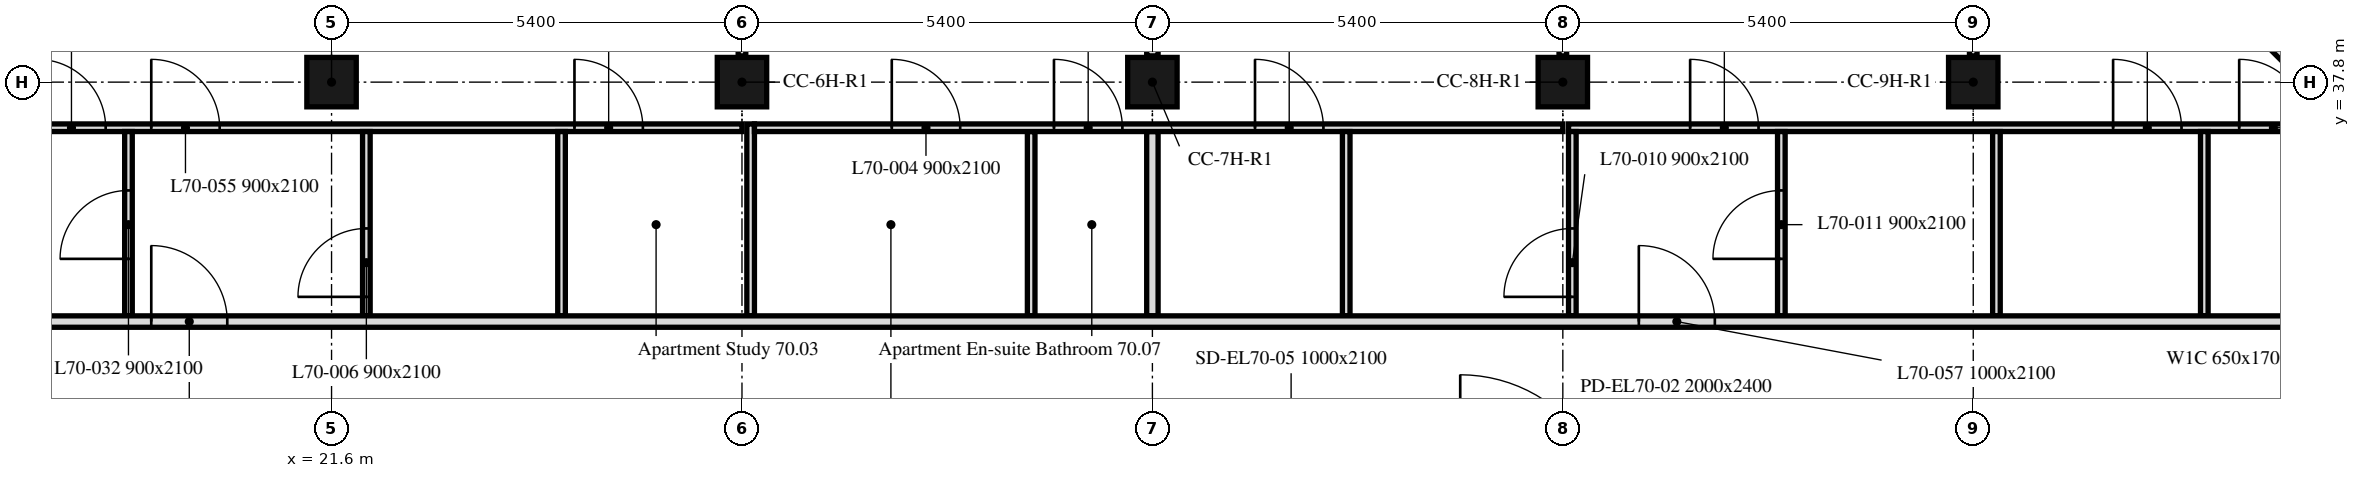
"""IFC4 building model, lengths in metres.
Left out: names, types, materials, properties, quantities, classifications, styles, units other than length and angle.
Written with IfcOpenShell. Run it as: python <this file> out.ifc"""

import sys

from ifc_helpers import new_model, si_unit, direction, frame, frame_2d, origin, origin_2d, place, context, subcontext, project, spatial, rectangle, extrude, element, fill, save


model = new_model("IFC4")
c1 = context("Model", 3, precision=1e-05, world=origin(), true_north=direction((0.0, 1.0)))
c2 = subcontext(c1, "Body", "Model", "MODEL_VIEW")
j1 = project(units=[si_unit("LENGTHUNIT", "METRE"), si_unit("PLANEANGLEUNIT", "RADIAN")], contexts=[c1])
p1 = place(None, origin())
s1 = spatial("IfcSite", under=j1, at=p1, CompositionType="ELEMENT")
p2 = place(p1, origin())
s2 = spatial("IfcBuilding", under=s1, at=p2, CompositionType="ELEMENT")
p3 = place(p2, frame((0.0, 0.0, 285.1)))
s3 = spatial("IfcBuildingStorey", under=s2, at=p3, CompositionType="ELEMENT", Elevation=285.1)
for number, where, z_axis, x_axis in (
    (1, (21.6, 37.8, 0.0), (0.0, 0.0, 1.0), (1.0, 0.0, 0.0)),
    (2, (27.0, 37.8, 0.0), (0.0, 0.0, 1.0), (1.0, 0.0, 0.0)),
    (3, (32.4, 37.8, 0.0), (0.0, 0.0, 1.0), (1.0, 0.0, 0.0)),
    (4, (37.8, 37.8, 0.0), (0.0, 0.0, 1.0), (1.0, 0.0, 0.0)),
    (5, (43.2, 37.8, 0.0), (0.0, 0.0, 1.0), (1.0, 0.0, 0.0)),
):
    element("IfcColumn", number, at=place(p3, frame(where, z_axis=z_axis, x_axis=x_axis)), inside=s3, PredefinedType="COLUMN", context=c2, shape_type="SweptSolid", body=[
        extrude(rectangle(XDim=0.65, YDim=0.65, at=origin_2d()), origin(), (0.0, 0.0, 1.0), 3.0),
    ])
p4 = place(p3, frame((47.901, 37.65, 0.0), z_axis=(0.0, 0.0, 1.0), x_axis=(-0.707106781187, 0.707106781187, 0.0)))
e6 = element("IfcWall", 6, at=p4, inside=s3, PredefinedType="SOLIDWALL", context=c2, shape_type="SweptSolid", body=[
    extrude(rectangle(XDim=6.86, YDim=0.3, at=frame_2d((3.43, 0.0))), origin(), (0.0, 0.0, 1.0), 3.0),
])
p5 = place(p4, frame((1.73, 0.0, 0.9)))
e7 = element("IfcOpeningElement", 7, at=p5, cuts=e6, PredefinedType="OPENING", context=c2, shape_type="SweptSolid", body=[
    extrude(rectangle(XDim=3.4, YDim=1.7, at=frame_2d((1.7, 0.85))), frame((0.0, 0.16, 0.0), z_axis=(0.0, -1.0, 0.0), x_axis=(1.0, 0.0, 0.0)), (0.0, 0.0, 1.0), 0.32),
])
p6 = place(p3, frame((10.8, 37.2, 0.0), z_axis=(0.0, 0.0, 1.0), x_axis=(1.0, 0.0, 0.0)))
e8 = element("IfcWall", 8, at=p6, inside=s3, PredefinedType="PARTITIONING", context=c2, shape_type="SweptSolid", body=[
    extrude(rectangle(XDim=16.2, YDim=0.1, at=frame_2d((8.1, 0.0))), origin(), (0.0, 0.0, 1.0), 2.4),
])
p7 = place(p6, frame((2.995, 0.0, 0.0)))
e9 = element("IfcOpeningElement", 9, at=p7, cuts=e8, PredefinedType="OPENING", context=c2, shape_type="SweptSolid", body=[
    extrude(rectangle(XDim=0.9, YDim=2.1, at=frame_2d((0.45, 1.05))), frame((0.0, 0.05, 0.0), z_axis=(0.0, -1.0, 0.0), x_axis=(1.0, 0.0, 0.0)), (0.0, 0.0, 1.0), 0.1),
])
p8 = place(p6, frame((13.996, 0.0, 0.0)))
e10 = element("IfcOpeningElement", 10, at=p8, cuts=e8, PredefinedType="OPENING", context=c2, shape_type="SweptSolid", body=[
    extrude(rectangle(XDim=0.9, YDim=2.1, at=frame_2d((0.45, 1.05))), frame((0.0, 0.05, 0.0), z_axis=(0.0, -1.0, 0.0), x_axis=(1.0, 0.0, 0.0)), (0.0, 0.0, 1.0), 0.1),
])
p9 = place(p6, frame((6.928, 0.0, 0.0)))
e11 = element("IfcOpeningElement", 11, at=p9, cuts=e8, PredefinedType="OPENING", context=c2, shape_type="SweptSolid", body=[
    extrude(rectangle(XDim=0.9, YDim=2.1, at=frame_2d((0.45, 1.05))), frame((0.0, 0.05, 0.0), z_axis=(0.0, -1.0, 0.0), x_axis=(1.0, 0.0, 0.0)), (0.0, 0.0, 1.0), 0.1),
])
p10 = place(p6, frame((8.428, 0.0, 0.0)))
e12 = element("IfcOpeningElement", 12, at=p10, cuts=e8, PredefinedType="OPENING", context=c2, shape_type="SweptSolid", body=[
    extrude(rectangle(XDim=0.9, YDim=2.1, at=frame_2d((0.45, 1.05))), frame((0.0, 0.05, 0.0), z_axis=(0.0, -1.0, 0.0), x_axis=(1.0, 0.0, 0.0)), (0.0, 0.0, 1.0), 0.1),
])
p11 = place(p3, frame((27.0, 38.145, 0.0), z_axis=(0.0, 0.0, 1.0), x_axis=(0.0, 1.0, 0.0)))
e13 = element("IfcWall", 13, at=p11, inside=s3, PredefinedType="PARTITIONING", context=c2, shape_type="SweptSolid", body=[
    extrude(rectangle(XDim=4.304, YDim=0.1, at=frame_2d((2.152, 0.0))), origin(), (0.0, 0.0, 1.0), 2.4),
])
p12 = place(p11, frame((1.98, 0.0, 0.0)))
e14 = element("IfcOpeningElement", 14, at=p12, cuts=e13, PredefinedType="OPENING", context=c2, shape_type="SweptSolid", body=[
    extrude(rectangle(XDim=0.9, YDim=2.1, at=frame_2d((0.45, 1.05))), frame((0.0, 0.05, 0.0), z_axis=(0.0, -1.0, 0.0), x_axis=(1.0, 0.0, 0.0)), (0.0, 0.0, 1.0), 0.1),
])
p13 = place(p3, frame((32.4, 38.145, 0.0), z_axis=(0.0, 0.0, 1.0), x_axis=(0.0, 1.0, 0.0)))
e15 = element("IfcWall", 15, at=p13, inside=s3, PredefinedType="PARTITIONING", context=c2, shape_type="SweptSolid", body=[
    extrude(rectangle(XDim=4.304, YDim=0.15, at=frame_2d((2.152, 0.0))), origin(), (0.0, 0.0, 1.0), 2.4),
])
p14 = place(p3, frame((18.928, 34.725, 0.0), z_axis=(0.0, 0.0, 1.0), x_axis=(0.0, 1.0, 0.0)))
e16 = element("IfcWall", 16, at=p14, inside=s3, PredefinedType="PARTITIONING", context=c2, shape_type="SweptSolid", body=[
    extrude(rectangle(XDim=2.425, YDim=0.1, at=frame_2d((1.212, 0.0))), origin(), (0.0, 0.0, 1.0), 3.0),
])
p15 = place(p14, frame((0.75, 0.0, 0.0)))
e17 = element("IfcOpeningElement", 17, at=p15, cuts=e16, PredefinedType="OPENING", context=c2, shape_type="SweptSolid", body=[
    extrude(rectangle(XDim=0.9, YDim=2.1, at=frame_2d((0.45, 1.05))), frame((0.0, 0.05, 0.0), z_axis=(0.0, -1.0, 0.0), x_axis=(1.0, 0.0, 0.0)), (0.0, 0.0, 1.0), 0.1),
])
p16 = place(p3, frame((22.058, 34.725, 0.0), z_axis=(0.0, 0.0, 1.0), x_axis=(0.0, 1.0, 0.0)))
e18 = element("IfcWall", 18, at=p16, inside=s3, PredefinedType="PARTITIONING", context=c2, shape_type="SweptSolid", body=[
    extrude(rectangle(XDim=2.425, YDim=0.1, at=frame_2d((1.212, 0.0))), origin(), (0.0, 0.0, 1.0), 3.0),
])
p17 = place(p16, frame((0.25, 0.0, 0.0)))
e19 = element("IfcOpeningElement", 19, at=p17, cuts=e18, PredefinedType="OPENING", context=c2, shape_type="SweptSolid", body=[
    extrude(rectangle(XDim=0.9, YDim=2.1, at=frame_2d((0.45, 1.05))), frame((0.0, 0.05, 0.0), z_axis=(0.0, -1.0, 0.0), x_axis=(1.0, 0.0, 0.0)), (0.0, 0.0, 1.0), 0.1),
])
p18 = place(p3, frame((24.626, 34.725, 0.0), z_axis=(0.0, 0.0, 1.0), x_axis=(0.0, 1.0, 0.0)))
e20 = element("IfcWall", 20, at=p18, inside=s3, PredefinedType="PARTITIONING", context=c2, shape_type="SweptSolid", body=[
    extrude(rectangle(XDim=2.425, YDim=0.1, at=frame_2d((1.212, 0.0))), origin(), (0.0, 0.0, 1.0), 3.0),
])
p19 = place(p3, frame((27.114, 34.725, 0.0), z_axis=(0.0, 0.0, 1.0), x_axis=(0.0, 1.0, 0.0)))
e21 = element("IfcWall", 21, at=p19, inside=s3, PredefinedType="PARTITIONING", context=c2, shape_type="SweptSolid", body=[
    extrude(rectangle(XDim=2.525, YDim=0.1, at=frame_2d((1.262, 0.0))), origin(), (0.0, 0.0, 1.0), 2.4),
])
p20 = place(p3, frame((30.805, 34.725, 0.0), z_axis=(0.0, 0.0, 1.0), x_axis=(0.0, 1.0, 0.0)))
e22 = element("IfcWall", 22, at=p20, inside=s3, PredefinedType="PARTITIONING", context=c2, shape_type="SweptSolid", body=[
    extrude(rectangle(XDim=2.425, YDim=0.1, at=frame_2d((1.212, 0.0))), origin(), (0.0, 0.0, 1.0), 3.0),
])
p21 = place(p3, frame((32.4, 34.725, 0.0), z_axis=(0.0, 0.0, 1.0), x_axis=(0.0, 1.0, 0.0)))
e23 = element("IfcWall", 23, at=p21, inside=s3, PredefinedType="PARTITIONING", context=c2, shape_type="SweptSolid", body=[
    extrude(rectangle(XDim=2.425, YDim=0.15, at=frame_2d((1.212, 0.0))), origin(), (0.0, 0.0, 1.0), 2.4),
])
p22 = place(p3, frame((27.164, 37.2, 0.0), z_axis=(0.0, 0.0, 1.0), x_axis=(1.0, 0.0, 0.0)))
e24 = element("IfcWall", 24, at=p22, inside=s3, PredefinedType="PARTITIONING", context=c2, shape_type="SweptSolid", body=[
    extrude(rectangle(XDim=10.636, YDim=0.1, at=frame_2d((5.318, 0.0))), origin(), (0.0, 0.0, 1.0), 2.4),
])
p23 = place(p22, frame((1.807, 0.0, 0.0)))
e25 = element("IfcOpeningElement", 25, at=p23, cuts=e24, PredefinedType="OPENING", context=c2, shape_type="SweptSolid", body=[
    extrude(rectangle(XDim=0.9, YDim=2.1, at=frame_2d((0.45, 1.05))), frame((0.0, 0.05, 0.0), z_axis=(0.0, -1.0, 0.0), x_axis=(1.0, 0.0, 0.0)), (0.0, 0.0, 1.0), 0.1),
])
p24 = place(p22, frame((3.941, 0.0, 0.0)))
e26 = element("IfcOpeningElement", 26, at=p24, cuts=e24, PredefinedType="OPENING", context=c2, shape_type="SweptSolid", body=[
    extrude(rectangle(XDim=0.9, YDim=2.1, at=frame_2d((0.45, 1.05))), frame((0.0, 0.05, 0.0), z_axis=(0.0, -1.0, 0.0), x_axis=(1.0, 0.0, 0.0)), (0.0, 0.0, 1.0), 0.1),
])
p25 = place(p22, frame((6.586, 0.0, 0.0)))
e27 = element("IfcOpeningElement", 27, at=p25, cuts=e24, PredefinedType="OPENING", context=c2, shape_type="SweptSolid", body=[
    extrude(rectangle(XDim=0.9, YDim=2.1, at=frame_2d((0.45, 1.05))), frame((0.0, 0.05, 0.0), z_axis=(0.0, -1.0, 0.0), x_axis=(1.0, 0.0, 0.0)), (0.0, 0.0, 1.0), 0.1),
])
p26 = place(p3, frame((37.8, 38.145, 0.0), z_axis=(0.0, 0.0, 1.0), x_axis=(0.0, 1.0, 0.0)))
e28 = element("IfcWall", 28, at=p26, inside=s3, PredefinedType="PARTITIONING", context=c2, shape_type="SweptSolid", body=[
    extrude(rectangle(XDim=4.304, YDim=0.1, at=frame_2d((2.152, 0.0))), origin(), (0.0, 0.0, 1.0), 2.4),
])
p27 = place(p26, frame((1.98, 0.0, 0.0)))
e29 = element("IfcOpeningElement", 29, at=p27, cuts=e28, PredefinedType="OPENING", context=c2, shape_type="SweptSolid", body=[
    extrude(rectangle(XDim=0.9, YDim=2.1, at=frame_2d((0.45, 1.05))), frame((0.0, 0.05, 0.0), z_axis=(0.0, -1.0, 0.0), x_axis=(1.0, 0.0, 0.0)), (0.0, 0.0, 1.0), 0.1),
])
p28 = place(p3, frame((43.2, 38.145, 0.0), z_axis=(0.0, 0.0, 1.0), x_axis=(0.0, 1.0, 0.0)))
e30 = element("IfcWall", 30, at=p28, inside=s3, PredefinedType="PARTITIONING", context=c2, shape_type="SweptSolid", body=[
    extrude(rectangle(XDim=3.943, YDim=0.1, at=frame_2d((1.971, 0.0))), origin(), (0.0, 0.0, 1.0), 3.0),
])
p29 = place(p28, frame((1.355, 0.0, 0.0)))
e31 = element("IfcOpeningElement", 31, at=p29, cuts=e30, PredefinedType="OPENING", context=c2, shape_type="SweptSolid", body=[
    extrude(rectangle(XDim=0.9, YDim=2.1, at=frame_2d((0.45, 1.05))), frame((0.0, 0.05, 0.0), z_axis=(0.0, -1.0, 0.0), x_axis=(1.0, 0.0, 0.0)), (0.0, 0.0, 1.0), 0.1),
])
p30 = place(p3, frame((37.875, 37.2, 0.0), z_axis=(0.0, 0.0, 1.0), x_axis=(1.0, 0.0, 0.0)))
e32 = element("IfcWall", 32, at=p30, inside=s3, PredefinedType="PARTITIONING", context=c2, shape_type="SweptSolid", body=[
    extrude(rectangle(XDim=9.974, YDim=0.1, at=frame_2d((4.987, 0.0))), origin(), (0.0, 0.0, 1.0), 3.0),
])
p31 = place(p30, frame((7.165, 0.0, 0.0)))
e33 = element("IfcOpeningElement", 33, at=p31, cuts=e32, PredefinedType="OPENING", context=c2, shape_type="SweptSolid", body=[
    extrude(rectangle(XDim=0.9, YDim=2.1, at=frame_2d((0.45, 1.05))), frame((0.0, 0.05, 0.0), z_axis=(0.0, -1.0, 0.0), x_axis=(1.0, 0.0, 0.0)), (0.0, 0.0, 1.0), 0.1),
])
p32 = place(p30, frame((8.824, 0.0, 0.0)))
e34 = element("IfcOpeningElement", 34, at=p32, cuts=e32, PredefinedType="OPENING", context=c2, shape_type="SweptSolid", body=[
    extrude(rectangle(XDim=0.9, YDim=2.1, at=frame_2d((0.45, 1.05))), frame((0.0, 0.05, 0.0), z_axis=(0.0, -1.0, 0.0), x_axis=(1.0, 0.0, 0.0)), (0.0, 0.0, 1.0), 0.1),
])
p33 = place(p30, frame((1.6, 0.0, 0.0)))
e35 = element("IfcOpeningElement", 35, at=p33, cuts=e32, PredefinedType="OPENING", context=c2, shape_type="SweptSolid", body=[
    extrude(rectangle(XDim=0.9, YDim=2.1, at=frame_2d((0.45, 1.05))), frame((0.0, 0.05, 0.0), z_axis=(0.0, -1.0, 0.0), x_axis=(1.0, 0.0, 0.0)), (0.0, 0.0, 1.0), 0.1),
])
p34 = place(p3, frame((34.95, 34.725, 0.0), z_axis=(0.0, 0.0, 1.0), x_axis=(0.0, 1.0, 0.0)))
e36 = element("IfcWall", 36, at=p34, inside=s3, PredefinedType="PARTITIONING", context=c2, shape_type="SweptSolid", body=[
    extrude(rectangle(XDim=2.425, YDim=0.1, at=frame_2d((1.212, 0.0))), origin(), (0.0, 0.0, 1.0), 3.0),
])
p35 = place(p3, frame((37.925, 34.725, 0.0), z_axis=(0.0, 0.0, 1.0), x_axis=(0.0, 1.0, 0.0)))
e37 = element("IfcWall", 37, at=p35, inside=s3, PredefinedType="PARTITIONING", context=c2, shape_type="SweptSolid", body=[
    extrude(rectangle(XDim=2.425, YDim=0.1, at=frame_2d((1.212, 0.0))), origin(), (0.0, 0.0, 1.0), 2.4),
])
p36 = place(p35, frame((0.25, 0.0, 0.0)))
e38 = element("IfcOpeningElement", 38, at=p36, cuts=e37, PredefinedType="OPENING", context=c2, shape_type="SweptSolid", body=[
    extrude(rectangle(XDim=0.9, YDim=2.1, at=frame_2d((0.45, 1.05))), frame((0.0, 0.05, 0.0), z_axis=(0.0, -1.0, 0.0), x_axis=(1.0, 0.0, 0.0)), (0.0, 0.0, 1.0), 0.1),
])
p37 = place(p3, frame((40.675, 34.725, 0.0), z_axis=(0.0, 0.0, 1.0), x_axis=(0.0, 1.0, 0.0)))
e39 = element("IfcWall", 39, at=p37, inside=s3, PredefinedType="PARTITIONING", context=c2, shape_type="SweptSolid", body=[
    extrude(rectangle(XDim=2.425, YDim=0.1, at=frame_2d((1.212, 0.0))), origin(), (0.0, 0.0, 1.0), 3.0),
])
p38 = place(p37, frame((0.75, 0.0, 0.0)))
e40 = element("IfcOpeningElement", 40, at=p38, cuts=e39, PredefinedType="OPENING", context=c2, shape_type="SweptSolid", body=[
    extrude(rectangle(XDim=0.9, YDim=2.1, at=frame_2d((0.45, 1.05))), frame((0.0, 0.05, 0.0), z_axis=(0.0, -1.0, 0.0), x_axis=(1.0, 0.0, 0.0)), (0.0, 0.0, 1.0), 0.1),
])
for number, where, z_axis, x_axis in (
    (41, (43.505, 34.725, 0.0), (0.0, 0.0, 1.0), (0.0, 1.0, 0.0)),
    (42, (46.24, 34.725, 0.0), (0.0, 0.0, 1.0), (0.0, 1.0, 0.0)),
):
    element("IfcWall", number, at=place(p3, frame(where, z_axis=z_axis, x_axis=x_axis)), inside=s3, PredefinedType="PARTITIONING", context=c2, shape_type="SweptSolid", body=[
        extrude(rectangle(XDim=2.425, YDim=0.1, at=frame_2d((1.212, 0.0))), origin(), (0.0, 0.0, 1.0), 3.0),
    ])
p39 = place(p3, frame((6.151, 34.65, 0.0), z_axis=(0.0, 0.0, 1.0), x_axis=(1.0, 0.0, 0.0)))
e43 = element("IfcWall", 43, at=p39, inside=s3, PredefinedType="PARTITIONING", context=c2, shape_type="SweptSolid", body=[
    extrude(rectangle(XDim=41.698, YDim=0.15, at=frame_2d((20.849, 0.0))), origin(), (0.0, 0.0, 1.0), 2.4),
])
p40 = place(p39, frame((2.519, 0.0, 0.0)))
e44 = element("IfcOpeningElement", 44, at=p40, cuts=e43, PredefinedType="OPENING", context=c2, shape_type="SweptSolid", body=[
    extrude(rectangle(XDim=1.0, YDim=2.1, at=frame_2d((0.5, 1.05))), frame((0.0, 0.075, 0.0), z_axis=(0.0, -1.0, 0.0), x_axis=(1.0, 0.0, 0.0)), (0.0, 0.0, 1.0), 0.15),
])
p41 = place(p39, frame((13.077, 0.0, 0.0)))
e45 = element("IfcOpeningElement", 45, at=p41, cuts=e43, PredefinedType="OPENING", context=c2, shape_type="SweptSolid", body=[
    extrude(rectangle(XDim=1.0, YDim=2.1, at=frame_2d((0.5, 1.05))), frame((0.0, 0.075, 0.0), z_axis=(0.0, -1.0, 0.0), x_axis=(1.0, 0.0, 0.0)), (0.0, 0.0, 1.0), 0.15),
])
p42 = place(p39, frame((32.649, 0.0, 0.0)))
e46 = element("IfcOpeningElement", 46, at=p42, cuts=e43, PredefinedType="OPENING", context=c2, shape_type="SweptSolid", body=[
    extrude(rectangle(XDim=1.0, YDim=2.1, at=frame_2d((0.5, 1.05))), frame((0.0, 0.075, 0.0), z_axis=(0.0, -1.0, 0.0), x_axis=(1.0, 0.0, 0.0)), (0.0, 0.0, 1.0), 0.15),
])
p43 = place(p8, origin())
e47 = element("IfcDoor", 47, at=p43, inside=s3, OperationType="SINGLE_SWING_RIGHT", PredefinedType="DOOR", context=c2, shape_type="SweptSolid", body=[
    extrude(rectangle(XDim=0.9, YDim=2.1, at=frame_2d((0.45, 1.05))), frame((0.0, 0.025, 0.0), z_axis=(0.0, -1.0, 0.0), x_axis=(1.0, 0.0, 0.0)), (0.0, 0.0, 1.0), 0.05),
])
fill(e10, e47)
p44 = place(p23, origin())
e48 = element("IfcDoor", 48, at=p44, inside=s3, OperationType="SINGLE_SWING_LEFT", PredefinedType="DOOR", context=c2, shape_type="SweptSolid", body=[
    extrude(rectangle(XDim=0.9, YDim=2.1, at=frame_2d((0.45, 1.05))), frame((0.0, 0.025, 0.0), z_axis=(0.0, -1.0, 0.0), x_axis=(1.0, 0.0, 0.0)), (0.0, 0.0, 1.0), 0.05),
])
fill(e25, e48)
p45 = place(p24, origin())
e49 = element("IfcDoor", 49, at=p45, inside=s3, OperationType="SINGLE_SWING_RIGHT", PredefinedType="DOOR", context=c2, shape_type="SweptSolid", body=[
    extrude(rectangle(XDim=0.9, YDim=2.1, at=frame_2d((0.45, 1.05))), frame((0.0, 0.025, 0.0), z_axis=(0.0, -1.0, 0.0), x_axis=(1.0, 0.0, 0.0)), (0.0, 0.0, 1.0), 0.05),
])
fill(e26, e49)
p46 = place(p17, origin())
e50 = element("IfcDoor", 50, at=p46, inside=s3, OperationType="SINGLE_SWING_LEFT", PredefinedType="DOOR", context=c2, shape_type="SweptSolid", body=[
    extrude(rectangle(XDim=0.9, YDim=2.1, at=frame_2d((0.45, 1.05))), frame((0.0, 0.025, 0.0), z_axis=(0.0, -1.0, 0.0), x_axis=(1.0, 0.0, 0.0)), (0.0, 0.0, 1.0), 0.05),
])
fill(e19, e50)
p47 = place(p25, origin())
e51 = element("IfcDoor", 51, at=p47, inside=s3, OperationType="SINGLE_SWING_LEFT", PredefinedType="DOOR", context=c2, shape_type="SweptSolid", body=[
    extrude(rectangle(XDim=0.9, YDim=2.1, at=frame_2d((0.45, 1.05))), frame((0.0, 0.025, 0.0), z_axis=(0.0, -1.0, 0.0), x_axis=(1.0, 0.0, 0.0)), (0.0, 0.0, 1.0), 0.05),
])
fill(e27, e51)
p48 = place(p31, origin())
e52 = element("IfcDoor", 52, at=p48, inside=s3, OperationType="SINGLE_SWING_RIGHT", PredefinedType="DOOR", context=c2, shape_type="SweptSolid", body=[
    extrude(rectangle(XDim=0.9, YDim=2.1, at=frame_2d((0.45, 1.05))), frame((0.0, 0.025, 0.0), z_axis=(0.0, -1.0, 0.0), x_axis=(1.0, 0.0, 0.0)), (0.0, 0.0, 1.0), 0.05),
])
fill(e33, e52)
p49 = place(p32, origin())
e53 = element("IfcDoor", 53, at=p49, inside=s3, OperationType="SINGLE_SWING_LEFT", PredefinedType="DOOR", context=c2, shape_type="SweptSolid", body=[
    extrude(rectangle(XDim=0.9, YDim=2.1, at=frame_2d((0.45, 1.05))), frame((0.0, 0.025, 0.0), z_axis=(0.0, -1.0, 0.0), x_axis=(1.0, 0.0, 0.0)), (0.0, 0.0, 1.0), 0.05),
])
fill(e34, e53)
p50 = place(p36, origin())
e54 = element("IfcDoor", 54, at=p50, inside=s3, OperationType="SINGLE_SWING_RIGHT", PredefinedType="DOOR", context=c2, shape_type="SweptSolid", body=[
    extrude(rectangle(XDim=0.9, YDim=2.1, at=frame_2d((0.45, 1.05))), frame((0.0, 0.025, 0.0), z_axis=(0.0, -1.0, 0.0), x_axis=(1.0, 0.0, 0.0)), (0.0, 0.0, 1.0), 0.05),
])
fill(e38, e54)
p51 = place(p38, origin())
e55 = element("IfcDoor", 55, at=p51, inside=s3, OperationType="SINGLE_SWING_LEFT", PredefinedType="DOOR", context=c2, shape_type="SweptSolid", body=[
    extrude(rectangle(XDim=0.9, YDim=2.1, at=frame_2d((0.45, 1.05))), frame((0.0, 0.025, 0.0), z_axis=(0.0, -1.0, 0.0), x_axis=(1.0, 0.0, 0.0)), (0.0, 0.0, 1.0), 0.05),
])
fill(e40, e55)
p52 = place(p9, origin())
e56 = element("IfcDoor", 56, at=p52, inside=s3, OperationType="SINGLE_SWING_LEFT", PredefinedType="DOOR", context=c2, shape_type="SweptSolid", body=[
    extrude(rectangle(XDim=0.9, YDim=2.1, at=frame_2d((0.45, 1.05))), frame((0.0, 0.025, 0.0), z_axis=(0.0, -1.0, 0.0), x_axis=(1.0, 0.0, 0.0)), (0.0, 0.0, 1.0), 0.05),
])
fill(e11, e56)
p53 = place(p15, origin())
e57 = element("IfcDoor", 57, at=p53, inside=s3, OperationType="SINGLE_SWING_LEFT", PredefinedType="DOOR", context=c2, shape_type="SweptSolid", body=[
    extrude(rectangle(XDim=0.9, YDim=2.1, at=frame_2d((0.45, 1.05))), frame((0.0, 0.025, 0.0), z_axis=(0.0, -1.0, 0.0), x_axis=(1.0, 0.0, 0.0)), (0.0, 0.0, 1.0), 0.05),
])
fill(e17, e57)
p54 = place(p33, origin())
e58 = element("IfcDoor", 58, at=p54, inside=s3, OperationType="SINGLE_SWING_LEFT", PredefinedType="DOOR", context=c2, shape_type="SweptSolid", body=[
    extrude(rectangle(XDim=0.9, YDim=2.1, at=frame_2d((0.45, 1.05))), frame((0.0, 0.025, 0.0), z_axis=(0.0, -1.0, 0.0), x_axis=(1.0, 0.0, 0.0)), (0.0, 0.0, 1.0), 0.05),
])
fill(e35, e58)
p55 = place(p10, origin())
e59 = element("IfcDoor", 59, at=p55, inside=s3, OperationType="SINGLE_SWING_RIGHT", PredefinedType="DOOR", context=c2, shape_type="SweptSolid", body=[
    extrude(rectangle(XDim=0.9, YDim=2.1, at=frame_2d((0.45, 1.05))), frame((0.0, 0.025, 0.0), z_axis=(0.0, -1.0, 0.0), x_axis=(1.0, 0.0, 0.0)), (0.0, 0.0, 1.0), 0.05),
])
fill(e12, e59)
p56 = place(p41, origin())
e60 = element("IfcDoor", 60, at=p56, inside=s3, OperationType="SINGLE_SWING_RIGHT", PredefinedType="DOOR", context=c2, shape_type="SweptSolid", body=[
    extrude(rectangle(XDim=1.0, YDim=2.1, at=frame_2d((0.5, 1.05))), frame((0.0, 0.025, 0.0), z_axis=(0.0, -1.0, 0.0), x_axis=(1.0, 0.0, 0.0)), (0.0, 0.0, 1.0), 0.05),
])
fill(e45, e60)
p57 = place(p42, origin())
e61 = element("IfcDoor", 61, at=p57, inside=s3, OperationType="SINGLE_SWING_RIGHT", PredefinedType="DOOR", context=c2, shape_type="SweptSolid", body=[
    extrude(rectangle(XDim=1.0, YDim=2.1, at=frame_2d((0.5, 1.05))), frame((0.0, 0.025, 0.0), z_axis=(0.0, -1.0, 0.0), x_axis=(1.0, 0.0, 0.0)), (0.0, 0.0, 1.0), 0.05),
])
fill(e46, e61)
save(model, sys.argv[1])
